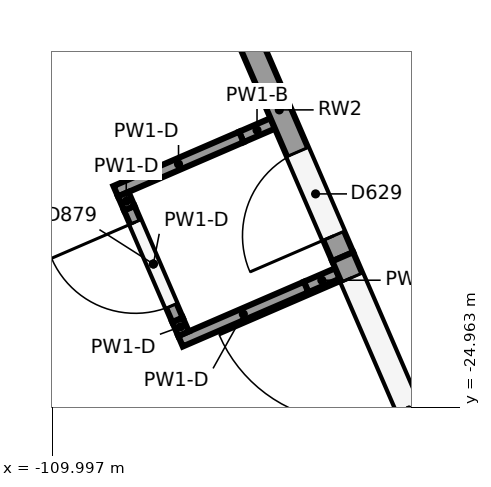
"""IFC4 building model, lengths in metres.
Left out: names, types, materials, properties, quantities, classifications, styles, units other than length and angle.
Written with IfcOpenShell. Run it as: python <this file> out.ifc"""

import sys

from ifc_helpers import new_model, si_unit, direction, frame, frame_2d, origin, place, context, subcontext, project, spatial, rectangle, extrude, element, fill, save


model = new_model("IFC4")
c1 = context("Model", 3, precision=1e-05, world=origin(), true_north=direction((0.0, 1.0)))
c2 = subcontext(c1, "Body", "Model", "MODEL_VIEW")
j1 = project(units=[si_unit("LENGTHUNIT", "METRE"), si_unit("PLANEANGLEUNIT", "RADIAN")], contexts=[c1])
p1 = place(None, origin())
s1 = spatial("IfcSite", under=j1, at=p1, CompositionType="ELEMENT")
p2 = place(p1, origin())
s2 = spatial("IfcBuilding", under=s1, at=p2, CompositionType="ELEMENT")
p3 = place(p2, origin())
s3 = spatial("IfcBuildingStorey", under=s2, at=p3, CompositionType="ELEMENT", Elevation=0.0)
p4 = place(p3, frame((-104.427, -27.02, 0.0), z_axis=(0.0, 0.0, 1.0), x_axis=(-0.396623075329, 0.917981555434, 0.0)))
e1 = element("IfcWall", 1, at=p4, inside=s3, PredefinedType="SOLIDWALL", context=c2, shape_type="SweptSolid", body=[
    extrude(rectangle(XDim=4.4, YDim=0.3, at=frame_2d((2.2, 0.0))), origin(), (0.0, 0.0, 1.0), 4.85),
])
p5 = place(p4, frame((0.3, 0.0, 0.0)))
e2 = element("IfcOpeningElement", 2, at=p5, cuts=e1, PredefinedType="OPENING", context=c2, shape_type="SweptSolid", body=[
    extrude(rectangle(XDim=3.8, YDim=2.8, at=frame_2d((1.9, 1.4))), frame((0.0, 0.16, 0.0), z_axis=(0.0, -1.0, 0.0), x_axis=(1.0, 0.0, 0.0)), (0.0, 0.0, 1.0), 0.32),
])
p6 = place(p3, frame((-106.173, -22.98, 0.0), z_axis=(0.0, 0.0, 1.0), x_axis=(-0.396529362849, 0.918022039168, 0.0)))
e3 = element("IfcWall", 3, at=p6, inside=s3, PredefinedType="SOLIDWALL", context=c2, shape_type="SweptSolid", body=[
    extrude(rectangle(XDim=4.208, YDim=0.3, at=frame_2d((2.104, 0.0))), origin(), (0.0, 0.0, 1.0), 4.85),
])
p7 = place(p6, frame((0.3, 0.0, 0.0)))
e4 = element("IfcOpeningElement", 4, at=p7, cuts=e3, PredefinedType="OPENING", context=c2, shape_type="SweptSolid", body=[
    extrude(rectangle(XDim=1.2, YDim=2.1, at=frame_2d((0.6, 1.05))), frame((0.0, 0.16, 0.0), z_axis=(0.0, -1.0, 0.0), x_axis=(1.0, 0.0, 0.0)), (0.0, 0.0, 1.0), 0.32),
])
p8 = place(p3, frame((-106.241, -23.2, 0.0), z_axis=(0.0, 0.0, 1.0), x_axis=(-0.91799053418, -0.396602293431, 0.0)))
e5 = element("IfcWall", 5, at=p8, inside=s3, PredefinedType="PARTITIONING", context=c2, shape_type="SweptSolid", body=[
    extrude(rectangle(XDim=0.45, YDim=0.15, at=frame_2d((0.225, 0.0))), origin(), (0.0, 0.0, 1.0), 4.85),
])
p9 = place(p3, frame((-106.654, -23.379, 0.0), z_axis=(0.0, 0.0, 1.0), x_axis=(-0.918011864983, -0.39655291671, 0.0)))
e6 = element("IfcWall", 6, at=p9, inside=s3, PredefinedType="PARTITIONING", context=c2, shape_type="SweptSolid", body=[
    extrude(rectangle(XDim=1.8, YDim=0.15, at=frame_2d((0.9, 0.0))), origin(), (0.0, 0.0, 1.0), 6.1),
])
p10 = place(p3, frame((-107.094, -21.227, 0.0), z_axis=(0.0, 0.0, 1.0), x_axis=(-0.91799053418, -0.396602293431, 0.0)))
e7 = element("IfcWall", 7, at=p10, inside=s3, PredefinedType="PARTITIONING", context=c2, shape_type="SweptSolid", body=[
    extrude(rectangle(XDim=0.45, YDim=0.15, at=frame_2d((0.225, 0.0))), origin(), (0.0, 0.0, 1.0), 4.85),
])
p11 = place(p3, frame((-107.507, -21.405, 0.0), z_axis=(0.0, 0.0, 1.0), x_axis=(-0.91799053418, -0.396602293431, 0.0)))
e8 = element("IfcWall", 8, at=p11, inside=s3, PredefinedType="PARTITIONING", context=c2, shape_type="SweptSolid", body=[
    extrude(rectangle(XDim=1.8, YDim=0.15, at=frame_2d((0.9, 0.0))), origin(), (0.0, 0.0, 1.0), 6.1),
])
p12 = place(p3, frame((-108.267, -23.994, 0.0), z_axis=(0.0, 0.0, 1.0), x_axis=(-0.396716586321, 0.917941147426, 0.0)))
e9 = element("IfcWall", 9, at=p12, inside=s3, PredefinedType="PARTITIONING", context=c2, shape_type="SweptSolid", body=[
    extrude(rectangle(XDim=0.2, YDim=0.15, at=frame_2d((0.1, 0.0))), origin(), (0.0, 0.0, 1.0), 6.1),
])
p13 = place(p3, frame((-108.346, -23.811, 0.0), z_axis=(0.0, 0.0, 1.0), x_axis=(-0.396588005523, 0.917996706898, 0.0)))
e10 = element("IfcWall", 10, at=p13, inside=s3, PredefinedType="PARTITIONING", context=c2, shape_type="SweptSolid", body=[
    extrude(rectangle(XDim=1.6, YDim=0.15, at=frame_2d((0.8, 0.0))), origin(), (0.0, 0.0, 1.0), 6.1),
])
p14 = place(p13, frame((0.2, 0.0, 0.0)))
e11 = element("IfcOpeningElement", 11, at=p14, cuts=e10, PredefinedType="OPENING", context=c2, shape_type="SweptSolid", body=[
    extrude(rectangle(XDim=1.2, YDim=2.1, at=frame_2d((0.6, 1.05))), frame((0.0, 0.085, 0.0), z_axis=(0.0, -1.0, 0.0), x_axis=(1.0, 0.0, 0.0)), (0.0, 0.0, 1.0), 0.17),
])
p15 = place(p3, frame((-108.981, -22.342, 0.0), z_axis=(0.0, 0.0, 1.0), x_axis=(-0.396716586321, 0.917941147426, 0.0)))
e12 = element("IfcWall", 12, at=p15, inside=s3, PredefinedType="PARTITIONING", context=c2, shape_type="SweptSolid", body=[
    extrude(rectangle(XDim=0.2, YDim=0.15, at=frame_2d((0.1, 0.0))), origin(), (0.0, 0.0, 1.0), 6.1),
])
p16 = place(p5, origin())
e13 = element("IfcDoor", 13, at=p16, inside=s3, OperationType="DOUBLE_DOOR_SINGLE_SWING", PredefinedType="DOOR", context=c2, shape_type="SweptSolid", body=[
    extrude(rectangle(XDim=3.8, YDim=2.8, at=frame_2d((1.9, 1.4))), frame((0.0, 0.025, 0.0), z_axis=(0.0, -1.0, 0.0), x_axis=(1.0, 0.0, 0.0)), (0.0, 0.0, 1.0), 0.05),
])
fill(e2, e13)
p17 = place(p7, origin())
e14 = element("IfcDoor", 14, at=p17, inside=s3, OperationType="SINGLE_SWING_LEFT", PredefinedType="DOOR", context=c2, shape_type="SweptSolid", body=[
    extrude(rectangle(XDim=1.2, YDim=2.1, at=frame_2d((0.6, 1.05))), frame((0.0, 0.025, 0.0), z_axis=(0.0, -1.0, 0.0), x_axis=(1.0, 0.0, 0.0)), (0.0, 0.0, 1.0), 0.05),
])
fill(e4, e14)
p18 = place(p14, origin())
e15 = element("IfcDoor", 15, at=p18, inside=s3, OperationType="SINGLE_SWING_RIGHT", PredefinedType="DOOR", context=c2, shape_type="SweptSolid", body=[
    extrude(rectangle(XDim=1.2, YDim=2.1, at=frame_2d((0.6, 1.05))), frame((0.0, 0.025, 0.0), z_axis=(0.0, -1.0, 0.0), x_axis=(1.0, 0.0, 0.0)), (0.0, 0.0, 1.0), 0.05),
])
fill(e11, e15)
save(model, sys.argv[1])
